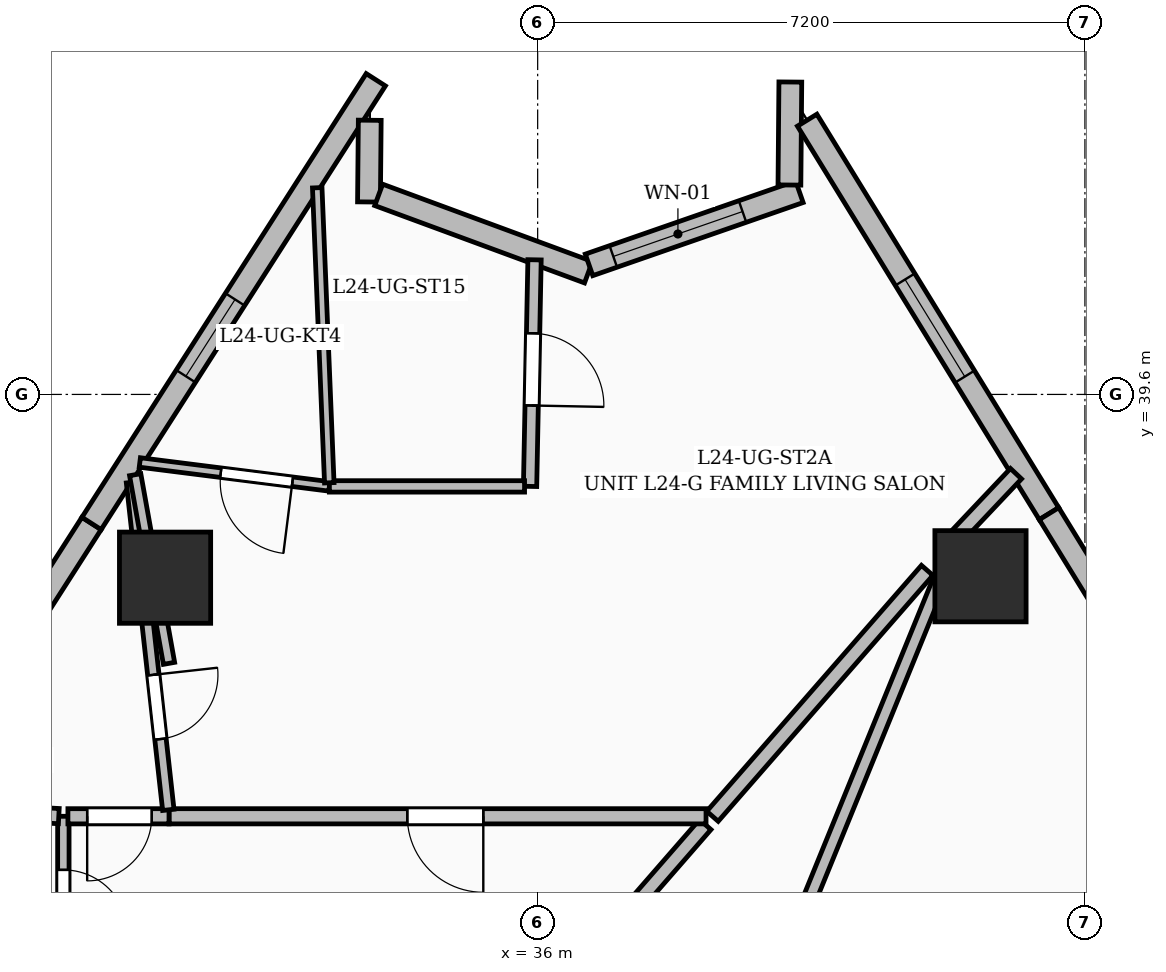
"""IFC4 building model, lengths in metres.
Left out: names, types, materials, properties, quantities, classifications, styles, units other than length and angle.
Written with IfcOpenShell. Run it as: python <this file> out.ifc"""

import sys

from ifc_helpers import new_model, si_unit, direction, frame, frame_2d, origin, origin_2d, place, context, subcontext, project, spatial, rectangle, extrude, element, fill, save


model = new_model("IFC4")
c1 = context("Model", 3, precision=1e-05, world=origin(), true_north=direction((0.0, 1.0)))
c2 = subcontext(c1, "Body", "Model", "MODEL_VIEW")
j1 = project(units=[si_unit("LENGTHUNIT", "METRE"), si_unit("PLANEANGLEUNIT", "RADIAN")], contexts=[c1])
p1 = place(None, origin())
s1 = spatial("IfcSite", under=j1, at=p1, CompositionType="ELEMENT")
p2 = place(p1, origin())
s2 = spatial("IfcBuilding", under=s1, at=p2, CompositionType="ELEMENT")
p3 = place(p2, frame((0.0, 0.0, 96.6)))
s3 = spatial("IfcBuildingStorey", under=s2, at=p3, CompositionType="ELEMENT", Elevation=96.6)
for number, where, z_axis, x_axis in (
    (1, (41.826, 37.208, 0.0), (0.0, 0.0, 1.0), (1.0, 0.0, 0.0)),
    (2, (31.098, 37.189, 0.0), (0.0, 0.0, 1.0), (1.0, 0.0, 0.0)),
):
    element("IfcColumn", number, at=place(p3, frame(where, z_axis=z_axis, x_axis=x_axis)), inside=s3, PredefinedType="COLUMN", context=c2, shape_type="SweptSolid", body=[
        extrude(rectangle(XDim=1.2, YDim=1.2, at=origin_2d()), origin(), (0.0, 0.0, 1.0), 3.6),
    ])
p4 = place(p3, frame((26.362, 32.021, 0.0), z_axis=(0.0, 0.0, 1.0), x_axis=(0.539453319381, 0.842015508295, 0.0)))
e3 = element("IfcWall", 3, at=p4, inside=s3, PredefinedType="SOLIDWALL", context=c2, shape_type="SweptSolid", body=[
    extrude(rectangle(XDim=6.985, YDim=0.3, at=frame_2d((3.493, 0.0))), origin(), (0.0, 0.0, 1.0), 3.3),
])
p5 = place(p4, frame((3.953, 0.0, 0.6)))
e4 = element("IfcOpeningElement", 4, at=p5, cuts=e3, PredefinedType="OPENING", context=c2, shape_type="SweptSolid", body=[
    extrude(rectangle(XDim=1.5, YDim=2.1, at=frame_2d((0.75, 1.05))), frame((0.0, 0.16, 0.0), z_axis=(0.0, -1.0, 0.0), x_axis=(1.0, 0.0, 0.0)), (0.0, 0.0, 1.0), 0.32),
])
p6 = place(p3, frame((30.131, 37.903, 0.0), z_axis=(0.0, 0.0, 1.0), x_axis=(0.539468344174, 0.842005882185, 0.0)))
e5 = element("IfcWall", 5, at=p6, inside=s3, PredefinedType="SOLIDWALL", context=c2, shape_type="SweptSolid", body=[
    extrude(rectangle(XDim=6.933, YDim=0.3, at=frame_2d((3.466, 0.0))), origin(), (0.0, 0.0, 1.0), 3.3),
])
p7 = place(p6, frame((2.3, 0.0, 0.8)))
e6 = element("IfcOpeningElement", 6, at=p7, cuts=e5, PredefinedType="OPENING", context=c2, shape_type="SweptSolid", body=[
    extrude(rectangle(XDim=1.2, YDim=1.8, at=frame_2d((0.6, 0.9))), frame((0.0, 0.16, 0.0), z_axis=(0.0, -1.0, 0.0), x_axis=(1.0, 0.0, 0.0)), (0.0, 0.0, 1.0), 0.32),
])
p8 = place(p3, frame((33.791, 43.207, 0.0), z_axis=(0.0, 0.0, 1.0), x_axis=(-0.009538516763, -0.999954507314, 0.0)))
e7 = element("IfcWall", 7, at=p8, inside=s3, PredefinedType="SOLIDWALL", context=c2, shape_type="SweptSolid", body=[
    extrude(rectangle(XDim=1.075, YDim=0.3, at=frame_2d((0.538, 0.0))), origin(), (0.0, 0.0, 1.0), 3.3),
])
p9 = place(p3, frame((33.909, 42.225, 0.0), z_axis=(0.0, 0.0, 1.0), x_axis=(0.938225446259, -0.346024582931, 0.0)))
e8 = element("IfcWall", 8, at=p9, inside=s3, PredefinedType="SOLIDWALL", context=c2, shape_type="SweptSolid", body=[
    extrude(rectangle(XDim=2.941, YDim=0.3, at=frame_2d((1.471, 0.0))), origin(), (0.0, 0.0, 1.0), 3.3),
])
p10 = place(p3, frame((36.676, 41.304, 0.0), z_axis=(0.0, 0.0, 1.0), x_axis=(0.944564229059, 0.328326692765, 0.0)))
e9 = element("IfcWall", 9, at=p10, inside=s3, PredefinedType="SOLIDWALL", context=c2, shape_type="SweptSolid", body=[
    extrude(rectangle(XDim=2.93, YDim=0.3, at=frame_2d((1.465, 0.0))), origin(), (0.0, 0.0, 1.0), 3.3),
])
p11 = place(p10, frame((0.338, 0.0, 0.6)))
e10 = element("IfcOpeningElement", 10, at=p11, cuts=e9, PredefinedType="OPENING", context=c2, shape_type="SweptSolid", body=[
    extrude(rectangle(XDim=1.8, YDim=2.1, at=frame_2d((0.9, 1.05))), frame((0.0, 0.16, 0.0), z_axis=(0.0, -1.0, 0.0), x_axis=(1.0, 0.0, 0.0)), (0.0, 0.0, 1.0), 0.32),
])
p12 = place(p3, frame((39.312, 42.355, 0.0), z_axis=(0.0, 0.0, 1.0), x_axis=(0.008828484753, 0.999961028169, 0.0)))
e11 = element("IfcWall", 11, at=p12, inside=s3, PredefinedType="SOLIDWALL", context=c2, shape_type="SweptSolid", body=[
    extrude(rectangle(XDim=1.355, YDim=0.3, at=frame_2d((0.677, 0.0))), origin(), (0.0, 0.0, 1.0), 3.3),
])
p13 = place(p3, frame((39.546, 43.208, 0.0), z_axis=(0.0, 0.0, 1.0), x_axis=(0.523660209905, -0.851927217879, 0.0)))
e12 = element("IfcWall", 12, at=p13, inside=s3, PredefinedType="SOLIDWALL", context=c2, shape_type="SweptSolid", body=[
    extrude(rectangle(XDim=6.076, YDim=0.3, at=frame_2d((3.038, 0.0))), origin(), (0.0, 0.0, 1.0), 3.3),
])
p14 = place(p13, frame((2.46, 0.0, 0.6)))
e13 = element("IfcOpeningElement", 13, at=p14, cuts=e12, PredefinedType="OPENING", context=c2, shape_type="SweptSolid", body=[
    extrude(rectangle(XDim=1.5, YDim=2.1, at=frame_2d((0.75, 1.05))), frame((0.0, 0.16, 0.0), z_axis=(0.0, -1.0, 0.0), x_axis=(1.0, 0.0, 0.0)), (0.0, 0.0, 1.0), 0.32),
])
p15 = place(p3, frame((42.728, 38.031, 0.0), z_axis=(0.0, 0.0, 1.0), x_axis=(0.523672784649, -0.851919488343, 0.0)))
e14 = element("IfcWall", 14, at=p15, inside=s3, PredefinedType="SOLIDWALL", context=c2, shape_type="SweptSolid", body=[
    extrude(rectangle(XDim=6.641, YDim=0.3, at=frame_2d((3.321, 0.0))), origin(), (0.0, 0.0, 1.0), 3.3),
])
p16 = place(p15, frame((2.675, 0.0, 0.8)))
e15 = element("IfcOpeningElement", 15, at=p16, cuts=e14, PredefinedType="OPENING", context=c2, shape_type="SweptSolid", body=[
    extrude(rectangle(XDim=1.2, YDim=1.8, at=frame_2d((0.6, 0.9))), frame((0.0, 0.16, 0.0), z_axis=(0.0, -1.0, 0.0), x_axis=(1.0, 0.0, 0.0)), (0.0, 0.0, 1.0), 0.32),
])
p17 = place(p3, frame((38.205, 33.941, 0.0), z_axis=(0.0, 0.0, 1.0), x_axis=(-0.656942619395, -0.753940577779, 0.0)))
e16 = element("IfcWall", 16, at=p17, inside=s3, PredefinedType="PARTITIONING", context=c2, shape_type="SweptSolid", body=[
    extrude(rectangle(XDim=5.837, YDim=0.2, at=frame_2d((2.918, 0.0))), origin(), (0.0, 0.0, 1.0), 2.295),
])
p18 = place(p3, frame((33.402, 17.829, 0.0), z_axis=(0.0, 0.0, 1.0), x_axis=(0.377767569575, 0.925900460837, 0.0)))
e17 = element("IfcWall", 17, at=p18, inside=s3, PredefinedType="PARTITIONING", context=c2, shape_type="SweptSolid", body=[
    extrude(rectangle(XDim=21.516, YDim=0.175, at=frame_2d((10.758, 0.0))), origin(), (0.0, 0.0, 1.0), 2.259),
])
p19 = place(p3, frame((41.125, 37.285, 0.0), z_axis=(0.0, 0.0, 1.0), x_axis=(-0.657650992125, -0.753322754572, 0.0)))
e18 = element("IfcWall", 18, at=p19, inside=s3, PredefinedType="PARTITIONING", context=c2, shape_type="SweptSolid", body=[
    extrude(rectangle(XDim=4.295, YDim=0.2, at=frame_2d((2.147, 0.0))), origin(), (0.0, 0.0, 1.0), 2.32),
])
p20 = place(p3, frame((29.76, 34.05, 0.0), z_axis=(0.0, 0.0, 1.0), x_axis=(0.0, -1.0, 0.0)))
e19 = element("IfcWall", 19, at=p20, inside=s3, PredefinedType="PARTITIONING", context=c2, shape_type="SweptSolid", body=[
    extrude(rectangle(XDim=2.26, YDim=0.15, at=frame_2d((1.13, 0.0))), origin(), (0.0, 0.0, 1.0), 3.3),
])
p21 = place(p20, frame((0.705, 0.0, 0.0)))
e20 = element("IfcOpeningElement", 20, at=p21, cuts=e19, PredefinedType="OPENING", context=c2, shape_type="SweptSolid", body=[
    extrude(rectangle(XDim=0.85, YDim=2.1, at=frame_2d((0.425, 1.05))), frame((0.0, 0.085, 0.0), z_axis=(0.0, -1.0, 0.0), x_axis=(1.0, 0.0, 0.0)), (0.0, 0.0, 1.0), 0.17),
])
p22 = place(p3, frame((38.215, 34.05, 0.0), z_axis=(0.0, 0.0, 1.0), x_axis=(-1.0, 0.0, 0.0)))
e21 = element("IfcWall", 21, at=p22, inside=s3, PredefinedType="PARTITIONING", context=c2, shape_type="SweptSolid", body=[
    extrude(rectangle(XDim=7.065, YDim=0.2, at=frame_2d((3.533, 0.0))), origin(), (0.0, 0.0, 1.0), 2.295),
])
p23 = place(p22, frame((2.93, 0.0, 0.0)))
e22 = element("IfcOpeningElement", 22, at=p23, cuts=e21, PredefinedType="OPENING", context=c2, shape_type="SweptSolid", body=[
    extrude(rectangle(XDim=1.0, YDim=2.2, at=frame_2d((0.5, 1.1))), frame((0.0, 0.11, 0.0), z_axis=(0.0, -1.0, 0.0), x_axis=(1.0, 0.0, 0.0)), (0.0, 0.0, 1.0), 0.22),
])
p24 = place(p3, frame((31.15, 34.05, 0.0), z_axis=(0.0, 0.0, 1.0), x_axis=(-1.0, 0.0, 0.0)))
e23 = element("IfcWall", 23, at=p24, inside=s3, PredefinedType="PARTITIONING", context=c2, shape_type="SweptSolid", body=[
    extrude(rectangle(XDim=1.33, YDim=0.2, at=frame_2d((0.665, 0.0))), origin(), (0.0, 0.0, 1.0), 3.3),
])
p25 = place(p24, frame((0.227, 0.0, 0.0)))
e24 = element("IfcOpeningElement", 24, at=p25, cuts=e23, PredefinedType="OPENING", context=c2, shape_type="SweptSolid", body=[
    extrude(rectangle(XDim=0.85, YDim=2.1, at=frame_2d((0.425, 1.05))), frame((0.0, 0.11, 0.0), z_axis=(0.0, -1.0, 0.0), x_axis=(1.0, 0.0, 0.0)), (0.0, 0.0, 1.0), 0.22),
])
p26 = place(p3, frame((29.7, 34.052, 0.0), z_axis=(0.0, 0.0, 1.0), x_axis=(-0.998649577824, 0.051952100177, 0.0)))
e25 = element("IfcWall", 25, at=p26, inside=s3, PredefinedType="PARTITIONING", context=c2, shape_type="SweptSolid", body=[
    extrude(rectangle(XDim=1.837, YDim=0.2, at=frame_2d((0.919, 0.0))), origin(), (0.0, 0.0, 1.0), 2.32),
])
p27 = place(p3, frame((42.293, 38.557, 0.0), z_axis=(0.0, 0.0, 1.0), x_axis=(-0.687043041617, -0.726616720814, 0.0)))
e26 = element("IfcWall", 26, at=p27, inside=s3, PredefinedType="PARTITIONING", context=c2, shape_type="SweptSolid", body=[
    extrude(rectangle(XDim=1.11, YDim=0.2, at=frame_2d((0.555, 0.0))), origin(), (0.0, 0.0, 1.0), 3.3),
])
p28 = place(p3, frame((30.663, 38.444, 0.0), z_axis=(0.0, 0.0, 1.0), x_axis=(0.110196673345, -0.993909801332, 0.0)))
e27 = element("IfcWall", 27, at=p28, inside=s3, PredefinedType="PARTITIONING", context=c2, shape_type="SweptSolid", body=[
    extrude(rectangle(XDim=4.336, YDim=0.15, at=frame_2d((2.168, 0.0))), origin(), (0.0, 0.0, 1.0), 2.32),
])
p29 = place(p28, frame((2.548, 0.0, 0.0)))
e28 = element("IfcOpeningElement", 28, at=p29, cuts=e27, PredefinedType="OPENING", context=c2, shape_type="SweptSolid", body=[
    extrude(rectangle(XDim=0.85, YDim=2.1, at=frame_2d((0.425, 1.05))), frame((0.0, 0.085, 0.0), z_axis=(0.0, -1.0, 0.0), x_axis=(1.0, 0.0, 0.0)), (0.0, 0.0, 1.0), 0.17),
])
p30 = place(p3, frame((33.26, 38.39, 0.0), z_axis=(0.0, 0.0, 1.0), x_axis=(-0.992108113315, 0.125385371932, 0.0)))
e29 = element("IfcWall", 29, at=p30, inside=s3, PredefinedType="PARTITIONING", context=c2, shape_type="SweptSolid", body=[
    extrude(rectangle(XDim=2.514, YDim=0.125, at=frame_2d((1.257, 0.0))), origin(), (0.0, 0.0, 1.0), 3.3),
])
p31 = place(p30, frame((0.49, 0.0, 0.0)))
e30 = element("IfcOpeningElement", 30, at=p31, cuts=e29, PredefinedType="OPENING", context=c2, shape_type="SweptSolid", body=[
    extrude(rectangle(XDim=0.95, YDim=2.2, at=frame_2d((0.475, 1.1))), frame((0.0, 0.072, 0.0), z_axis=(0.0, -1.0, 0.0), x_axis=(1.0, 0.0, 0.0)), (0.0, 0.0, 1.0), 0.145),
])
p32 = place(p3, frame((35.959, 41.371, 0.0), z_axis=(0.0, 0.0, 1.0), x_axis=(-0.019814305947, -0.999803677369, 0.0)))
e31 = element("IfcWall", 31, at=p32, inside=s3, PredefinedType="PARTITIONING", context=c2, shape_type="SweptSolid", body=[
    extrude(rectangle(XDim=2.982, YDim=0.175, at=frame_2d((1.491, 0.0))), origin(), (0.0, 0.0, 1.0), 3.3),
])
p33 = place(p32, frame((0.967, 0.0, 0.0)))
e32 = element("IfcOpeningElement", 32, at=p33, cuts=e31, PredefinedType="OPENING", context=c2, shape_type="SweptSolid", body=[
    extrude(rectangle(XDim=0.95, YDim=2.2, at=frame_2d((0.475, 1.1))), frame((0.0, 0.097, 0.0), z_axis=(0.0, -1.0, 0.0), x_axis=(1.0, 0.0, 0.0)), (0.0, 0.0, 1.0), 0.195),
])
p34 = place(p3, frame((35.827, 38.39, 0.0), z_axis=(0.0, 0.0, 1.0), x_axis=(-1.0, 0.0, 0.0)))
e33 = element("IfcWall", 33, at=p34, inside=s3, PredefinedType="PARTITIONING", context=c2, shape_type="SweptSolid", body=[
    extrude(rectangle(XDim=2.567, YDim=0.15, at=frame_2d((1.284, 0.0))), origin(), (0.0, 0.0, 1.0), 3.3),
])
p35 = place(p3, frame((33.259, 38.438, 0.0), z_axis=(0.0, 0.0, 1.0), x_axis=(-0.040786210749, 0.999167896308, 0.0)))
e34 = element("IfcWall", 34, at=p35, inside=s3, PredefinedType="PARTITIONING", context=c2, shape_type="SweptSolid", body=[
    extrude(rectangle(XDim=3.885, YDim=0.125, at=frame_2d((1.942, 0.0))), origin(), (0.0, 0.0, 1.0), 3.3),
])
p36 = place(p3, frame((31.15, 36.062, 0.0), z_axis=(0.0, 0.0, 1.0), x_axis=(-0.176413917308, 0.984316072093, 0.0)))
e35 = element("IfcWall", 35, at=p36, inside=s3, PredefinedType="PARTITIONING", context=c2, shape_type="SweptSolid", body=[
    extrude(rectangle(XDim=2.521, YDim=0.15, at=frame_2d((1.261, 0.0))), origin(), (0.0, 0.0, 1.0), 3.3),
])
p37 = place(p7, origin())
e36 = element("IfcWindow", 36, at=p37, inside=s3, PartitioningType="SINGLE_PANEL", PredefinedType="WINDOW", context=c2, shape_type="SweptSolid", body=[
    extrude(rectangle(XDim=1.2, YDim=1.8, at=frame_2d((0.6, 0.9))), frame((0.0, 0.03, 0.0), z_axis=(0.0, -1.0, 0.0), x_axis=(1.0, 0.0, 0.0)), (0.0, 0.0, 1.0), 0.06),
])
fill(e6, e36)
p38 = place(p11, origin())
e37 = element("IfcWindow", 37, at=p38, inside=s3, PartitioningType="SINGLE_PANEL", PredefinedType="WINDOW", context=c2, shape_type="SweptSolid", body=[
    extrude(rectangle(XDim=1.8, YDim=2.1, at=frame_2d((0.9, 1.05))), frame((0.0, 0.03, 0.0), z_axis=(0.0, -1.0, 0.0), x_axis=(1.0, 0.0, 0.0)), (0.0, 0.0, 1.0), 0.06),
])
fill(e10, e37)
p39 = place(p14, origin())
e38 = element("IfcWindow", 38, at=p39, inside=s3, PartitioningType="SINGLE_PANEL", PredefinedType="WINDOW", context=c2, shape_type="SweptSolid", body=[
    extrude(rectangle(XDim=1.5, YDim=2.1, at=frame_2d((0.75, 1.05))), frame((0.0, 0.03, 0.0), z_axis=(0.0, -1.0, 0.0), x_axis=(1.0, 0.0, 0.0)), (0.0, 0.0, 1.0), 0.06),
])
fill(e13, e38)
p40 = place(p21, origin())
e39 = element("IfcDoor", 39, at=p40, inside=s3, OperationType="SINGLE_SWING_RIGHT", PredefinedType="DOOR", context=c2, shape_type="SweptSolid", body=[
    extrude(rectangle(XDim=0.85, YDim=2.1, at=frame_2d((0.425, 1.05))), frame((0.0, 0.025, 0.0), z_axis=(0.0, -1.0, 0.0), x_axis=(1.0, 0.0, 0.0)), (0.0, 0.0, 1.0), 0.05),
])
fill(e20, e39)
p41 = place(p31, origin())
e40 = element("IfcDoor", 40, at=p41, inside=s3, OperationType="SINGLE_SWING_LEFT", PredefinedType="DOOR", context=c2, shape_type="SweptSolid", body=[
    extrude(rectangle(XDim=0.95, YDim=2.2, at=frame_2d((0.475, 1.1))), frame((0.0, 0.025, 0.0), z_axis=(0.0, -1.0, 0.0), x_axis=(1.0, 0.0, 0.0)), (0.0, 0.0, 1.0), 0.05),
])
fill(e30, e40)
p42 = place(p33, origin())
e41 = element("IfcDoor", 41, at=p42, inside=s3, OperationType="SINGLE_SWING_RIGHT", PredefinedType="DOOR", context=c2, shape_type="SweptSolid", body=[
    extrude(rectangle(XDim=0.95, YDim=2.2, at=frame_2d((0.475, 1.1))), frame((0.0, 0.025, 0.0), z_axis=(0.0, -1.0, 0.0), x_axis=(1.0, 0.0, 0.0)), (0.0, 0.0, 1.0), 0.05),
])
fill(e32, e41)
p43 = place(p29, origin())
e42 = element("IfcDoor", 42, at=p43, inside=s3, OperationType="SINGLE_SWING_LEFT", PredefinedType="DOOR", context=c2, shape_type="SweptSolid", body=[
    extrude(rectangle(XDim=0.85, YDim=2.1, at=frame_2d((0.425, 1.05))), frame((0.0, 0.025, 0.0), z_axis=(0.0, -1.0, 0.0), x_axis=(1.0, 0.0, 0.0)), (0.0, 0.0, 1.0), 0.05),
])
fill(e28, e42)
p44 = place(p23, origin())
e43 = element("IfcDoor", 43, at=p44, inside=s3, OperationType="SINGLE_SWING_LEFT", PredefinedType="DOOR", context=c2, shape_type="SweptSolid", body=[
    extrude(rectangle(XDim=1.0, YDim=2.2, at=frame_2d((0.5, 1.1))), frame((0.0, 0.025, 0.0), z_axis=(0.0, -1.0, 0.0), x_axis=(1.0, 0.0, 0.0)), (0.0, 0.0, 1.0), 0.05),
])
fill(e22, e43)
p45 = place(p25, origin())
e44 = element("IfcDoor", 44, at=p45, inside=s3, OperationType="SINGLE_SWING_RIGHT", PredefinedType="DOOR", context=c2, shape_type="SweptSolid", body=[
    extrude(rectangle(XDim=0.85, YDim=2.1, at=frame_2d((0.425, 1.05))), frame((0.0, 0.025, 0.0), z_axis=(0.0, -1.0, 0.0), x_axis=(1.0, 0.0, 0.0)), (0.0, 0.0, 1.0), 0.05),
])
fill(e24, e44)
save(model, sys.argv[1])
